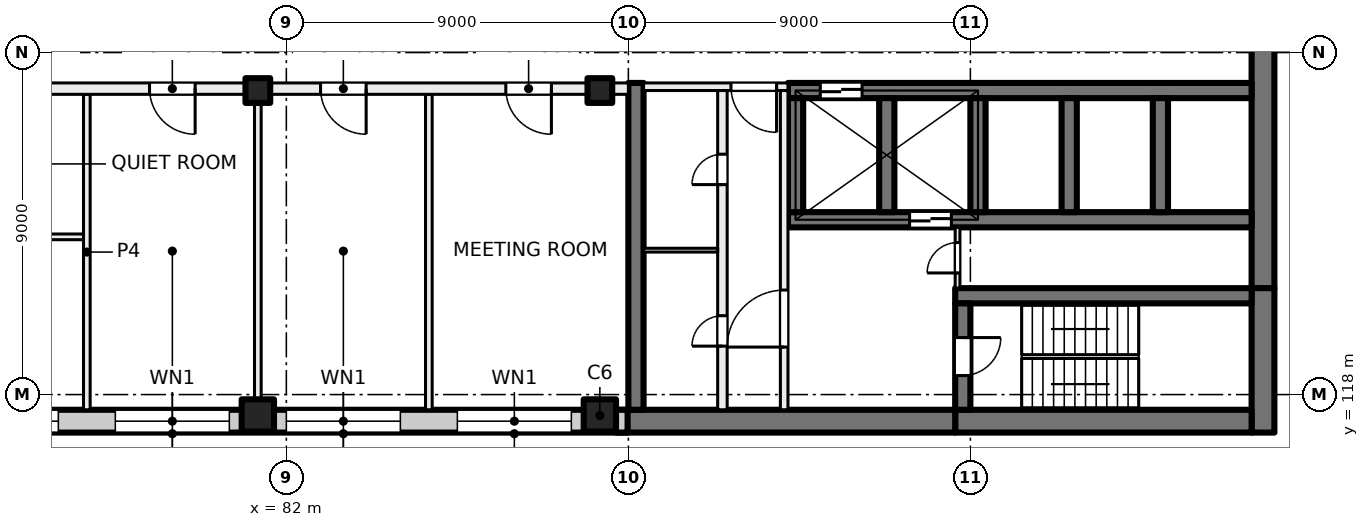
"""IFC4 building model, lengths in metres.
Left out: names, types, materials, properties, quantities, classifications, styles, units other than length and angle.
Written with IfcOpenShell. Run it as: python <this file> out.ifc"""

import sys

from ifc_helpers import new_model, si_unit, direction, frame, frame_2d, origin, origin_2d, place, context, subcontext, project, spatial, rectangle, extrude, element, fill, save


model = new_model("IFC4")
c1 = context("Model", 3, precision=1e-05, world=origin(), true_north=direction((0.0, 1.0)))
c2 = subcontext(c1, "Body", "Model", "MODEL_VIEW")
j1 = project(units=[si_unit("LENGTHUNIT", "METRE"), si_unit("PLANEANGLEUNIT", "RADIAN")], contexts=[c1])
p1 = place(None, origin())
s1 = spatial("IfcSite", under=j1, at=p1, CompositionType="ELEMENT")
p2 = place(p1, origin())
s2 = spatial("IfcBuilding", under=s1, at=p2, CompositionType="ELEMENT")
p3 = place(p2, frame((0.0, 0.0, 125.0)))
s3 = spatial("IfcBuildingStorey", under=s2, at=p3, CompositionType="ELEMENT", Elevation=125.0)
for number, where, z_axis, x_axis in (
    (1, (81.25, 126.0, 0.0), (0.0, 0.0, 1.0), (1.0, 0.0, 0.0)),
    (2, (90.25, 126.0, 0.0), (0.0, 0.0, 1.0), (1.0, 0.0, 0.0)),
):
    element("IfcColumn", number, at=place(p3, frame(where, z_axis=z_axis, x_axis=x_axis)), inside=s3, PredefinedType="COLUMN", context=c2, shape_type="SweptSolid", body=[
        extrude(rectangle(XDim=0.65, YDim=0.65, at=origin_2d()), origin(), (0.0, 0.0, 1.0), 4.0),
    ])
for number, where, z_axis, x_axis in (
    (3, (81.25, 117.45, 0.0), (0.0, 0.0, 1.0), (1.0, 0.0, 0.0)),
    (4, (90.25, 117.45, 0.0), (0.0, 0.0, 1.0), (1.0, 0.0, 0.0)),
):
    element("IfcColumn", number, at=place(p3, frame(where, z_axis=z_axis, x_axis=x_axis)), inside=s3, PredefinedType="COLUMN", context=c2, shape_type="SweptSolid", body=[
        extrude(rectangle(XDim=0.85, YDim=0.85, at=origin_2d()), origin(), (0.0, 0.0, 1.0), 4.0),
    ])
p4 = place(p3, frame((107.7, 135.2, 0.0), z_axis=(0.0, 0.0, 1.0), x_axis=(0.0, -1.0, 0.0)))
e5 = element("IfcWall", 5, at=p4, inside=s3, PredefinedType="SHEAR", context=c2, shape_type="SweptSolid", body=[
    extrude(rectangle(XDim=14.4, YDim=0.6, at=frame_2d((7.2, 0.0))), origin(), (0.0, 0.0, 1.0), 4.0),
])
p5 = place(p3, frame((107.7, 120.8, 0.0), z_axis=(0.0, 0.0, 1.0), x_axis=(0.0, -1.0, 0.0)))
e6 = element("IfcWall", 6, at=p5, inside=s3, PredefinedType="SHEAR", context=c2, shape_type="SweptSolid", body=[
    extrude(rectangle(XDim=3.8, YDim=0.6, at=frame_2d((1.9, 0.0))), origin(), (0.0, 0.0, 1.0), 4.0),
])
p6 = place(p3, frame((107.4, 117.3, 0.0), z_axis=(0.0, 0.0, 1.0), x_axis=(-1.0, 0.0, 0.0)))
e7 = element("IfcWall", 7, at=p6, inside=s3, PredefinedType="SHEAR", context=c2, shape_type="SweptSolid", body=[
    extrude(rectangle(XDim=7.8, YDim=0.6, at=frame_2d((3.9, 0.0))), origin(), (0.0, 0.0, 1.0), 4.0),
])
p7 = place(p3, frame((99.6, 117.3, 0.0), z_axis=(0.0, 0.0, 1.0), x_axis=(-1.0, 0.0, 0.0)))
e8 = element("IfcWall", 8, at=p7, inside=s3, PredefinedType="SHEAR", context=c2, shape_type="SweptSolid", body=[
    extrude(rectangle(XDim=8.925, YDim=0.6, at=frame_2d((4.462, 0.0))), origin(), (0.0, 0.0, 1.0), 4.0),
])
p8 = place(p3, frame((107.4, 120.6, 0.0), z_axis=(0.0, 0.0, 1.0), x_axis=(-1.0, 0.0, 0.0)))
e9 = element("IfcWall", 9, at=p8, inside=s3, PredefinedType="SHEAR", context=c2, shape_type="SweptSolid", body=[
    extrude(rectangle(XDim=7.8, YDim=0.4, at=frame_2d((3.9, 0.0))), origin(), (0.0, 0.0, 1.0), 4.0),
])
p9 = place(p3, frame((99.8, 120.4, 0.0), z_axis=(0.0, 0.0, 1.0), x_axis=(0.0, -1.0, 0.0)))
e10 = element("IfcWall", 10, at=p9, inside=s3, PredefinedType="SHEAR", context=c2, shape_type="SweptSolid", body=[
    extrude(rectangle(XDim=2.8, YDim=0.4, at=frame_2d((1.4, 0.0))), origin(), (0.0, 0.0, 1.0), 4.0),
])
p10 = place(p9, frame((0.9, 0.0, 0.0)))
e11 = element("IfcOpeningElement", 11, at=p10, cuts=e10, PredefinedType="OPENING", context=c2, shape_type="SweptSolid", body=[
    extrude(rectangle(XDim=1.0, YDim=2.1, at=frame_2d((0.5, 1.05))), frame((0.0, 0.21, 0.0), z_axis=(0.0, -1.0, 0.0), x_axis=(1.0, 0.0, 0.0)), (0.0, 0.0, 1.0), 0.42),
])
p11 = place(p3, frame((107.4, 126.0, 0.0), z_axis=(0.0, 0.0, 1.0), x_axis=(-1.0, 0.0, 0.0)))
e12 = element("IfcWall", 12, at=p11, inside=s3, PredefinedType="SHEAR", context=c2, shape_type="SweptSolid", body=[
    extrude(rectangle(XDim=12.2, YDim=0.4, at=frame_2d((6.1, 0.0))), origin(), (0.0, 0.0, 1.0), 4.0),
])
p12 = place(p11, frame((10.25, 0.0, 0.0)))
e13 = element("IfcOpeningElement", 13, at=p12, cuts=e12, PredefinedType="OPENING", context=c2, shape_type="SweptSolid", body=[
    extrude(rectangle(XDim=1.1, YDim=2.1, at=frame_2d((0.55, 1.05))), frame((0.0, 0.21, 0.0), z_axis=(0.0, -1.0, 0.0), x_axis=(1.0, 0.0, 0.0)), (0.0, 0.0, 1.0), 0.42),
])
p13 = place(p3, frame((107.4, 122.6, 0.0), z_axis=(0.0, 0.0, 1.0), x_axis=(-1.0, 0.0, 0.0)))
e14 = element("IfcWall", 14, at=p13, inside=s3, PredefinedType="SHEAR", context=c2, shape_type="SweptSolid", body=[
    extrude(rectangle(XDim=12.2, YDim=0.4, at=frame_2d((6.1, 0.0))), origin(), (0.0, 0.0, 1.0), 4.0),
])
p14 = place(p13, frame((7.9, 0.0, 0.0)))
e15 = element("IfcOpeningElement", 15, at=p14, cuts=e14, PredefinedType="OPENING", context=c2, shape_type="SweptSolid", body=[
    extrude(rectangle(XDim=1.1, YDim=2.1, at=frame_2d((0.55, 1.05))), frame((0.0, 0.21, 0.0), z_axis=(0.0, -1.0, 0.0), x_axis=(1.0, 0.0, 0.0)), (0.0, 0.0, 1.0), 0.42),
])
for number, where, z_axis, x_axis in (
    (16, (105.0, 125.8, 0.0), (0.0, 0.0, 1.0), (0.0, -1.0, 0.0)),
    (17, (102.6, 125.8, 0.0), (0.0, 0.0, 1.0), (0.0, -1.0, 0.0)),
    (18, (100.2, 125.8, 0.0), (0.0, 0.0, 1.0), (0.0, -1.0, 0.0)),
    (19, (97.8, 125.8, 0.0), (0.0, 0.0, 1.0), (0.0, -1.0, 0.0)),
    (20, (95.4, 125.8, 0.0), (0.0, 0.0, 1.0), (0.0, -1.0, 0.0)),
):
    element("IfcWall", number, at=place(p3, frame(where, z_axis=z_axis, x_axis=x_axis)), inside=s3, PredefinedType="SHEAR", context=c2, shape_type="SweptSolid", body=[
        extrude(rectangle(XDim=3.0, YDim=0.4, at=frame_2d((1.5, 0.0))), origin(), (0.0, 0.0, 1.0), 4.0),
    ])
p15 = place(p3, frame((91.2, 126.2, 0.0), z_axis=(0.0, 0.0, 1.0), x_axis=(0.0, -1.0, 0.0)))
e21 = element("IfcWall", 21, at=p15, inside=s3, PredefinedType="SHEAR", context=c2, shape_type="SweptSolid", body=[
    extrude(rectangle(XDim=8.6, YDim=0.4, at=frame_2d((4.3, 0.0))), origin(), (0.0, 0.0, 1.0), 4.0),
])
p16 = place(p3, frame((90.98, 117.3, 0.0), z_axis=(0.0, 0.0, 1.0), x_axis=(-1.0, 0.0, 0.0)))
e22 = element("IfcWall", 22, at=p16, inside=s3, PredefinedType="SOLIDWALL", context=c2, shape_type="SweptSolid", body=[
    extrude(rectangle(XDim=33.745, YDim=0.6, at=frame_2d((16.873, 0.0))), origin(), (0.0, 0.0, 1.0), 3.625),
])
p17 = place(p16, frame((1.48, 0.0, 0.9)))
e23 = element("IfcOpeningElement", 23, at=p17, cuts=e22, PredefinedType="OPENING", context=c2, shape_type="SweptSolid", body=[
    extrude(rectangle(XDim=3.0, YDim=2.4, at=frame_2d((1.5, 1.2))), frame((0.0, 0.31, 0.0), z_axis=(0.0, -1.0, 0.0), x_axis=(1.0, 0.0, 0.0)), (0.0, 0.0, 1.0), 0.62),
])
p18 = place(p16, frame((5.98, 0.0, 0.9)))
e24 = element("IfcOpeningElement", 24, at=p18, cuts=e22, PredefinedType="OPENING", context=c2, shape_type="SweptSolid", body=[
    extrude(rectangle(XDim=3.0, YDim=2.4, at=frame_2d((1.5, 1.2))), frame((0.0, 0.31, 0.0), z_axis=(0.0, -1.0, 0.0), x_axis=(1.0, 0.0, 0.0)), (0.0, 0.0, 1.0), 0.62),
])
p19 = place(p16, frame((10.48, 0.0, 0.9)))
e25 = element("IfcOpeningElement", 25, at=p19, cuts=e22, PredefinedType="OPENING", context=c2, shape_type="SweptSolid", body=[
    extrude(rectangle(XDim=3.0, YDim=2.4, at=frame_2d((1.5, 1.2))), frame((0.0, 0.31, 0.0), z_axis=(0.0, -1.0, 0.0), x_axis=(1.0, 0.0, 0.0)), (0.0, 0.0, 1.0), 0.62),
])
p20 = place(p16, frame((14.98, 0.0, 0.9)))
e26 = element("IfcOpeningElement", 26, at=p20, cuts=e22, PredefinedType="OPENING", context=c2, shape_type="SweptSolid", body=[
    extrude(rectangle(XDim=3.0, YDim=2.4, at=frame_2d((1.5, 1.2))), frame((0.0, 0.31, 0.0), z_axis=(0.0, -1.0, 0.0), x_axis=(1.0, 0.0, 0.0)), (0.0, 0.0, 1.0), 0.62),
])
p21 = place(p16, frame((19.48, 0.0, 0.9)))
e27 = element("IfcOpeningElement", 27, at=p21, cuts=e22, PredefinedType="OPENING", context=c2, shape_type="SweptSolid", body=[
    extrude(rectangle(XDim=3.0, YDim=2.4, at=frame_2d((1.5, 1.2))), frame((0.0, 0.31, 0.0), z_axis=(0.0, -1.0, 0.0), x_axis=(1.0, 0.0, 0.0)), (0.0, 0.0, 1.0), 0.62),
])
p22 = place(p16, frame((23.98, 0.0, 0.9)))
e28 = element("IfcOpeningElement", 28, at=p22, cuts=e22, PredefinedType="OPENING", context=c2, shape_type="SweptSolid", body=[
    extrude(rectangle(XDim=3.0, YDim=2.4, at=frame_2d((1.5, 1.2))), frame((0.0, 0.31, 0.0), z_axis=(0.0, -1.0, 0.0), x_axis=(1.0, 0.0, 0.0)), (0.0, 0.0, 1.0), 0.62),
])
p23 = place(p16, frame((28.48, 0.0, 0.9)))
e29 = element("IfcOpeningElement", 29, at=p23, cuts=e22, PredefinedType="OPENING", context=c2, shape_type="SweptSolid", body=[
    extrude(rectangle(XDim=3.0, YDim=2.4, at=frame_2d((1.5, 1.2))), frame((0.0, 0.31, 0.0), z_axis=(0.0, -1.0, 0.0), x_axis=(1.0, 0.0, 0.0)), (0.0, 0.0, 1.0), 0.62),
])
p24 = place(p3, frame((95.2, 126.1, 0.0), z_axis=(0.0, 0.0, 1.0), x_axis=(-1.0, 0.0, 0.0)))
e30 = element("IfcWall", 30, at=p24, inside=s3, PredefinedType="PARTITIONING", context=c2, shape_type="SweptSolid", body=[
    extrude(rectangle(XDim=3.8, YDim=0.2, at=frame_2d((1.9, 0.0))), origin(), (0.0, 0.0, 1.0), 3.625),
])
p25 = place(p24, frame((0.3, 0.0, 0.0)))
e31 = element("IfcOpeningElement", 31, at=p25, cuts=e30, PredefinedType="OPENING", context=c2, shape_type="SweptSolid", body=[
    extrude(rectangle(XDim=1.2, YDim=2.1, at=frame_2d((0.6, 1.05))), frame((0.0, 0.11, 0.0), z_axis=(0.0, -1.0, 0.0), x_axis=(1.0, 0.0, 0.0)), (0.0, 0.0, 1.0), 0.22),
])
p26 = place(p3, frame((95.1, 117.6, 0.0), z_axis=(0.0, 0.0, 1.0), x_axis=(0.0, 1.0, 0.0)))
e32 = element("IfcWall", 32, at=p26, inside=s3, PredefinedType="PARTITIONING", context=c2, shape_type="SweptSolid", body=[
    extrude(rectangle(XDim=8.4, YDim=0.2, at=frame_2d((4.2, 0.0))), origin(), (0.0, 0.0, 1.0), 3.625),
])
p27 = place(p26, frame((1.65, 0.0, 0.0)))
e33 = element("IfcOpeningElement", 33, at=p27, cuts=e32, PredefinedType="OPENING", context=c2, shape_type="SweptSolid", body=[
    extrude(rectangle(XDim=1.5, YDim=2.1, at=frame_2d((0.75, 1.05))), frame((0.0, 0.11, 0.0), z_axis=(0.0, -1.0, 0.0), x_axis=(1.0, 0.0, 0.0)), (0.0, 0.0, 1.0), 0.22),
])
p28 = place(p3, frame((93.475, 117.6, 0.0), z_axis=(0.0, 0.0, 1.0), x_axis=(0.0, 1.0, 0.0)))
e34 = element("IfcWall", 34, at=p28, inside=s3, PredefinedType="PARTITIONING", context=c2, shape_type="SweptSolid", body=[
    extrude(rectangle(XDim=8.4, YDim=0.25, at=frame_2d((4.2, 0.0))), origin(), (0.0, 0.0, 1.0), 3.625),
])
p29 = place(p28, frame((5.925, 0.0, 0.0)))
e35 = element("IfcOpeningElement", 35, at=p29, cuts=e34, PredefinedType="OPENING", context=c2, shape_type="SweptSolid", body=[
    extrude(rectangle(XDim=0.8, YDim=2.1, at=frame_2d((0.4, 1.05))), frame((0.0, 0.135, 0.0), z_axis=(0.0, -1.0, 0.0), x_axis=(1.0, 0.0, 0.0)), (0.0, 0.0, 1.0), 0.27),
])
p30 = place(p28, frame((1.675, 0.0, 0.0)))
e36 = element("IfcOpeningElement", 36, at=p30, cuts=e34, PredefinedType="OPENING", context=c2, shape_type="SweptSolid", body=[
    extrude(rectangle(XDim=0.8, YDim=2.1, at=frame_2d((0.4, 1.05))), frame((0.0, 0.135, 0.0), z_axis=(0.0, -1.0, 0.0), x_axis=(1.0, 0.0, 0.0)), (0.0, 0.0, 1.0), 0.27),
])
p31 = place(p3, frame((99.663, 120.8, 0.0), z_axis=(0.0, 0.0, 1.0), x_axis=(0.0, 1.0, 0.0)))
e37 = element("IfcWall", 37, at=p31, inside=s3, PredefinedType="PARTITIONING", context=c2, shape_type="SweptSolid", body=[
    extrude(rectangle(XDim=1.6, YDim=0.125, at=frame_2d((0.8, 0.0))), origin(), (0.0, 0.0, 1.0), 3.625),
])
p32 = place(p31, frame((0.4, 0.0, 0.0)))
e38 = element("IfcOpeningElement", 38, at=p32, cuts=e37, PredefinedType="OPENING", context=c2, shape_type="SweptSolid", body=[
    extrude(rectangle(XDim=0.8, YDim=2.1, at=frame_2d((0.4, 1.05))), frame((0.0, 0.073, 0.0), z_axis=(0.0, -1.0, 0.0), x_axis=(1.0, 0.0, 0.0)), (0.0, 0.0, 1.0), 0.145),
])
p33 = place(p3, frame((93.35, 121.8, 0.0), z_axis=(0.0, 0.0, 1.0), x_axis=(-1.0, 0.0, 0.0)))
e39 = element("IfcWall", 39, at=p33, inside=s3, PredefinedType="PARTITIONING", context=c2, shape_type="SweptSolid", body=[
    extrude(rectangle(XDim=1.95, YDim=0.1, at=frame_2d((0.975, 0.0))), origin(), (0.0, 0.0, 1.0), 3.625),
])
p34 = place(p3, frame((76.75, 117.6, 0.0), z_axis=(0.0, 0.0, 1.0), x_axis=(0.0, 1.0, 0.0)))
e40 = element("IfcWall", 40, at=p34, inside=s3, PredefinedType="PARTITIONING", context=c2, shape_type="SweptSolid", body=[
    extrude(rectangle(XDim=8.3, YDim=0.175, at=frame_2d((4.15, 0.0))), origin(), (0.0, 0.0, 1.0), 3.625),
])
p35 = place(p3, frame((76.662, 122.15, 0.0), z_axis=(0.0, 0.0, 1.0), x_axis=(-1.0, 0.0, 0.0)))
e41 = element("IfcWall", 41, at=p35, inside=s3, PredefinedType="PARTITIONING", context=c2, shape_type="SweptSolid", body=[
    extrude(rectangle(XDim=2.912, YDim=0.15, at=frame_2d((1.456, 0.0))), origin(), (0.0, 0.0, 1.0), 3.625),
])
for number, where, z_axis, x_axis in (
    (42, (81.25, 117.6, 0.0), (0.0, 0.0, 1.0), (0.0, 1.0, 0.0)),
    (43, (85.75, 117.6, 0.0), (0.0, 0.0, 1.0), (0.0, 1.0, 0.0)),
):
    element("IfcWall", number, at=place(p3, frame(where, z_axis=z_axis, x_axis=x_axis)), inside=s3, PredefinedType="PARTITIONING", context=c2, shape_type="SweptSolid", body=[
        extrude(rectangle(XDim=8.3, YDim=0.175, at=frame_2d((4.15, 0.0))), origin(), (0.0, 0.0, 1.0), 3.625),
    ])
p36 = place(p3, frame((91.0, 126.05, 0.0), z_axis=(0.0, 0.0, 1.0), x_axis=(-1.0, 0.0, 0.0)))
e44 = element("IfcWall", 44, at=p36, inside=s3, PredefinedType="PARTITIONING", context=c2, shape_type="SweptSolid", body=[
    extrude(rectangle(XDim=43.785, YDim=0.3, at=frame_2d((21.893, 0.0))), origin(), (0.0, 0.0, 1.0), 3.625),
])
p37 = place(p36, frame((2.025, 0.0, 0.0)))
e45 = element("IfcOpeningElement", 45, at=p37, cuts=e44, PredefinedType="OPENING", context=c2, shape_type="SweptSolid", body=[
    extrude(rectangle(XDim=1.2, YDim=2.1, at=frame_2d((0.6, 1.05))), frame((0.0, 0.16, 0.0), z_axis=(0.0, -1.0, 0.0), x_axis=(1.0, 0.0, 0.0)), (0.0, 0.0, 1.0), 0.32),
])
p38 = place(p36, frame((6.9, 0.0, 0.0)))
e46 = element("IfcOpeningElement", 46, at=p38, cuts=e44, PredefinedType="OPENING", context=c2, shape_type="SweptSolid", body=[
    extrude(rectangle(XDim=1.2, YDim=2.1, at=frame_2d((0.6, 1.05))), frame((0.0, 0.16, 0.0), z_axis=(0.0, -1.0, 0.0), x_axis=(1.0, 0.0, 0.0)), (0.0, 0.0, 1.0), 0.32),
])
p39 = place(p36, frame((11.4, 0.0, 0.0)))
e47 = element("IfcOpeningElement", 47, at=p39, cuts=e44, PredefinedType="OPENING", context=c2, shape_type="SweptSolid", body=[
    extrude(rectangle(XDim=1.2, YDim=2.1, at=frame_2d((0.6, 1.05))), frame((0.0, 0.16, 0.0), z_axis=(0.0, -1.0, 0.0), x_axis=(1.0, 0.0, 0.0)), (0.0, 0.0, 1.0), 0.32),
])
p40 = place(p36, frame((15.25, 0.0, 0.0)))
e48 = element("IfcOpeningElement", 48, at=p40, cuts=e44, PredefinedType="OPENING", context=c2, shape_type="SweptSolid", body=[
    extrude(rectangle(XDim=1.0, YDim=2.1, at=frame_2d((0.5, 1.05))), frame((0.0, 0.16, 0.0), z_axis=(0.0, -1.0, 0.0), x_axis=(1.0, 0.0, 0.0)), (0.0, 0.0, 1.0), 0.32),
])
p41 = place(p36, frame((19.9, 0.0, 0.0)))
e49 = element("IfcOpeningElement", 49, at=p41, cuts=e44, PredefinedType="OPENING", context=c2, shape_type="SweptSolid", body=[
    extrude(rectangle(XDim=1.2, YDim=2.1, at=frame_2d((0.6, 1.05))), frame((0.0, 0.16, 0.0), z_axis=(0.0, -1.0, 0.0), x_axis=(1.0, 0.0, 0.0)), (0.0, 0.0, 1.0), 0.32),
])
p42 = place(p36, frame((23.85, 0.0, 0.0)))
e50 = element("IfcOpeningElement", 50, at=p42, cuts=e44, PredefinedType="OPENING", context=c2, shape_type="SweptSolid", body=[
    extrude(rectangle(XDim=1.8, YDim=2.1, at=frame_2d((0.9, 1.05))), frame((0.0, 0.16, 0.0), z_axis=(0.0, -1.0, 0.0), x_axis=(1.0, 0.0, 0.0)), (0.0, 0.0, 1.0), 0.32),
])
p43 = place(p36, frame((34.0, 0.0, 0.0)))
e51 = element("IfcOpeningElement", 51, at=p43, cuts=e44, PredefinedType="OPENING", context=c2, shape_type="SweptSolid", body=[
    extrude(rectangle(XDim=1.0, YDim=2.1, at=frame_2d((0.5, 1.05))), frame((0.0, 0.16, 0.0), z_axis=(0.0, -1.0, 0.0), x_axis=(1.0, 0.0, 0.0)), (0.0, 0.0, 1.0), 0.32),
])
p44 = place(p36, frame((39.296, 0.0, 0.0)))
e52 = element("IfcOpeningElement", 52, at=p44, cuts=e44, PredefinedType="OPENING", context=c2, shape_type="SweptSolid", body=[
    extrude(rectangle(XDim=1.8, YDim=2.1, at=frame_2d((0.9, 1.05))), frame((0.0, 0.16, 0.0), z_axis=(0.0, -1.0, 0.0), x_axis=(1.0, 0.0, 0.0)), (0.0, 0.0, 1.0), 0.32),
])
p45 = place(p17, origin())
e53 = element("IfcWindow", 53, at=p45, inside=s3, PartitioningType="SINGLE_PANEL", PredefinedType="WINDOW", context=c2, shape_type="SweptSolid", body=[
    extrude(rectangle(XDim=3.0, YDim=2.4, at=frame_2d((1.5, 1.2))), frame((0.0, 0.03, 0.0), z_axis=(0.0, -1.0, 0.0), x_axis=(1.0, 0.0, 0.0)), (0.0, 0.0, 1.0), 0.06),
])
fill(e23, e53)
p46 = place(p18, origin())
e54 = element("IfcWindow", 54, at=p46, inside=s3, PartitioningType="SINGLE_PANEL", PredefinedType="WINDOW", context=c2, shape_type="SweptSolid", body=[
    extrude(rectangle(XDim=3.0, YDim=2.4, at=frame_2d((1.5, 1.2))), frame((0.0, 0.03, 0.0), z_axis=(0.0, -1.0, 0.0), x_axis=(1.0, 0.0, 0.0)), (0.0, 0.0, 1.0), 0.06),
])
fill(e24, e54)
p47 = place(p19, origin())
e55 = element("IfcWindow", 55, at=p47, inside=s3, PartitioningType="SINGLE_PANEL", PredefinedType="WINDOW", context=c2, shape_type="SweptSolid", body=[
    extrude(rectangle(XDim=3.0, YDim=2.4, at=frame_2d((1.5, 1.2))), frame((0.0, 0.03, 0.0), z_axis=(0.0, -1.0, 0.0), x_axis=(1.0, 0.0, 0.0)), (0.0, 0.0, 1.0), 0.06),
])
fill(e25, e55)
p48 = place(p20, origin())
e56 = element("IfcWindow", 56, at=p48, inside=s3, PartitioningType="SINGLE_PANEL", PredefinedType="WINDOW", context=c2, shape_type="SweptSolid", body=[
    extrude(rectangle(XDim=3.0, YDim=2.4, at=frame_2d((1.5, 1.2))), frame((0.0, 0.03, 0.0), z_axis=(0.0, -1.0, 0.0), x_axis=(1.0, 0.0, 0.0)), (0.0, 0.0, 1.0), 0.06),
])
fill(e26, e56)
p49 = place(p12, origin())
e57 = element("IfcDoor", 57, at=p49, inside=s3, OperationType="DOUBLE_DOOR_SLIDING", PredefinedType="DOOR", context=c2, shape_type="SweptSolid", body=[
    extrude(rectangle(XDim=1.1, YDim=2.1, at=frame_2d((0.55, 1.05))), frame((0.0, 0.025, 0.0), z_axis=(0.0, -1.0, 0.0), x_axis=(1.0, 0.0, 0.0)), (0.0, 0.0, 1.0), 0.05),
])
fill(e13, e57)
p50 = place(p25, origin())
e58 = element("IfcDoor", 58, at=p50, inside=s3, OperationType="DOUBLE_DOOR_SINGLE_SWING", PredefinedType="DOOR", context=c2, shape_type="SweptSolid", body=[
    extrude(rectangle(XDim=1.2, YDim=2.1, at=frame_2d((0.6, 1.05))), frame((0.0, 0.025, 0.0), z_axis=(0.0, -1.0, 0.0), x_axis=(1.0, 0.0, 0.0)), (0.0, 0.0, 1.0), 0.05),
])
fill(e31, e58)
p51 = place(p27, origin())
e59 = element("IfcDoor", 59, at=p51, inside=s3, OperationType="DOUBLE_DOOR_SINGLE_SWING", PredefinedType="DOOR", context=c2, shape_type="SweptSolid", body=[
    extrude(rectangle(XDim=1.5, YDim=2.1, at=frame_2d((0.75, 1.05))), frame((0.0, 0.025, 0.0), z_axis=(0.0, -1.0, 0.0), x_axis=(1.0, 0.0, 0.0)), (0.0, 0.0, 1.0), 0.05),
])
fill(e33, e59)
p52 = place(p10, origin())
e60 = element("IfcDoor", 60, at=p52, inside=s3, OperationType="SINGLE_SWING_LEFT", PredefinedType="DOOR", context=c2, shape_type="SweptSolid", body=[
    extrude(rectangle(XDim=1.0, YDim=2.1, at=frame_2d((0.5, 1.05))), frame((0.0, 0.025, 0.0), z_axis=(0.0, -1.0, 0.0), x_axis=(1.0, 0.0, 0.0)), (0.0, 0.0, 1.0), 0.05),
])
fill(e11, e60)
p53 = place(p32, origin())
e61 = element("IfcDoor", 61, at=p53, inside=s3, OperationType="SINGLE_SWING_RIGHT", PredefinedType="DOOR", context=c2, shape_type="SweptSolid", body=[
    extrude(rectangle(XDim=0.8, YDim=2.1, at=frame_2d((0.4, 1.05))), frame((0.0, 0.025, 0.0), z_axis=(0.0, -1.0, 0.0), x_axis=(1.0, 0.0, 0.0)), (0.0, 0.0, 1.0), 0.05),
])
fill(e38, e61)
p54 = place(p29, origin())
e62 = element("IfcDoor", 62, at=p54, inside=s3, OperationType="SINGLE_SWING_LEFT", PredefinedType="DOOR", context=c2, shape_type="SweptSolid", body=[
    extrude(rectangle(XDim=0.8, YDim=2.1, at=frame_2d((0.4, 1.05))), frame((0.0, 0.025, 0.0), z_axis=(0.0, -1.0, 0.0), x_axis=(1.0, 0.0, 0.0)), (0.0, 0.0, 1.0), 0.05),
])
fill(e35, e62)
p55 = place(p30, origin())
e63 = element("IfcDoor", 63, at=p55, inside=s3, OperationType="SINGLE_SWING_RIGHT", PredefinedType="DOOR", context=c2, shape_type="SweptSolid", body=[
    extrude(rectangle(XDim=0.8, YDim=2.1, at=frame_2d((0.4, 1.05))), frame((0.0, 0.025, 0.0), z_axis=(0.0, -1.0, 0.0), x_axis=(1.0, 0.0, 0.0)), (0.0, 0.0, 1.0), 0.05),
])
fill(e36, e63)
p56 = place(p14, origin())
e64 = element("IfcDoor", 64, at=p56, inside=s3, OperationType="DOUBLE_DOOR_SLIDING", PredefinedType="DOOR", context=c2, shape_type="SweptSolid", body=[
    extrude(rectangle(XDim=1.1, YDim=2.1, at=frame_2d((0.55, 1.05))), frame((0.0, 0.025, 0.0), z_axis=(0.0, -1.0, 0.0), x_axis=(1.0, 0.0, 0.0)), (0.0, 0.0, 1.0), 0.05),
])
fill(e15, e64)
p57 = place(p37, origin())
e65 = element("IfcDoor", 65, at=p57, inside=s3, OperationType="DOUBLE_DOOR_SINGLE_SWING", PredefinedType="DOOR", context=c2, shape_type="SweptSolid", body=[
    extrude(rectangle(XDim=1.2, YDim=2.1, at=frame_2d((0.6, 1.05))), frame((0.0, 0.025, 0.0), z_axis=(0.0, -1.0, 0.0), x_axis=(1.0, 0.0, 0.0)), (0.0, 0.0, 1.0), 0.05),
])
fill(e45, e65)
p58 = place(p38, origin())
e66 = element("IfcDoor", 66, at=p58, inside=s3, OperationType="DOUBLE_DOOR_SINGLE_SWING", PredefinedType="DOOR", context=c2, shape_type="SweptSolid", body=[
    extrude(rectangle(XDim=1.2, YDim=2.1, at=frame_2d((0.6, 1.05))), frame((0.0, 0.025, 0.0), z_axis=(0.0, -1.0, 0.0), x_axis=(1.0, 0.0, 0.0)), (0.0, 0.0, 1.0), 0.05),
])
fill(e46, e66)
p59 = place(p39, origin())
e67 = element("IfcDoor", 67, at=p59, inside=s3, OperationType="DOUBLE_DOOR_SINGLE_SWING", PredefinedType="DOOR", context=c2, shape_type="SweptSolid", body=[
    extrude(rectangle(XDim=1.2, YDim=2.1, at=frame_2d((0.6, 1.05))), frame((0.0, 0.025, 0.0), z_axis=(0.0, -1.0, 0.0), x_axis=(1.0, 0.0, 0.0)), (0.0, 0.0, 1.0), 0.05),
])
fill(e47, e67)
save(model, sys.argv[1])
